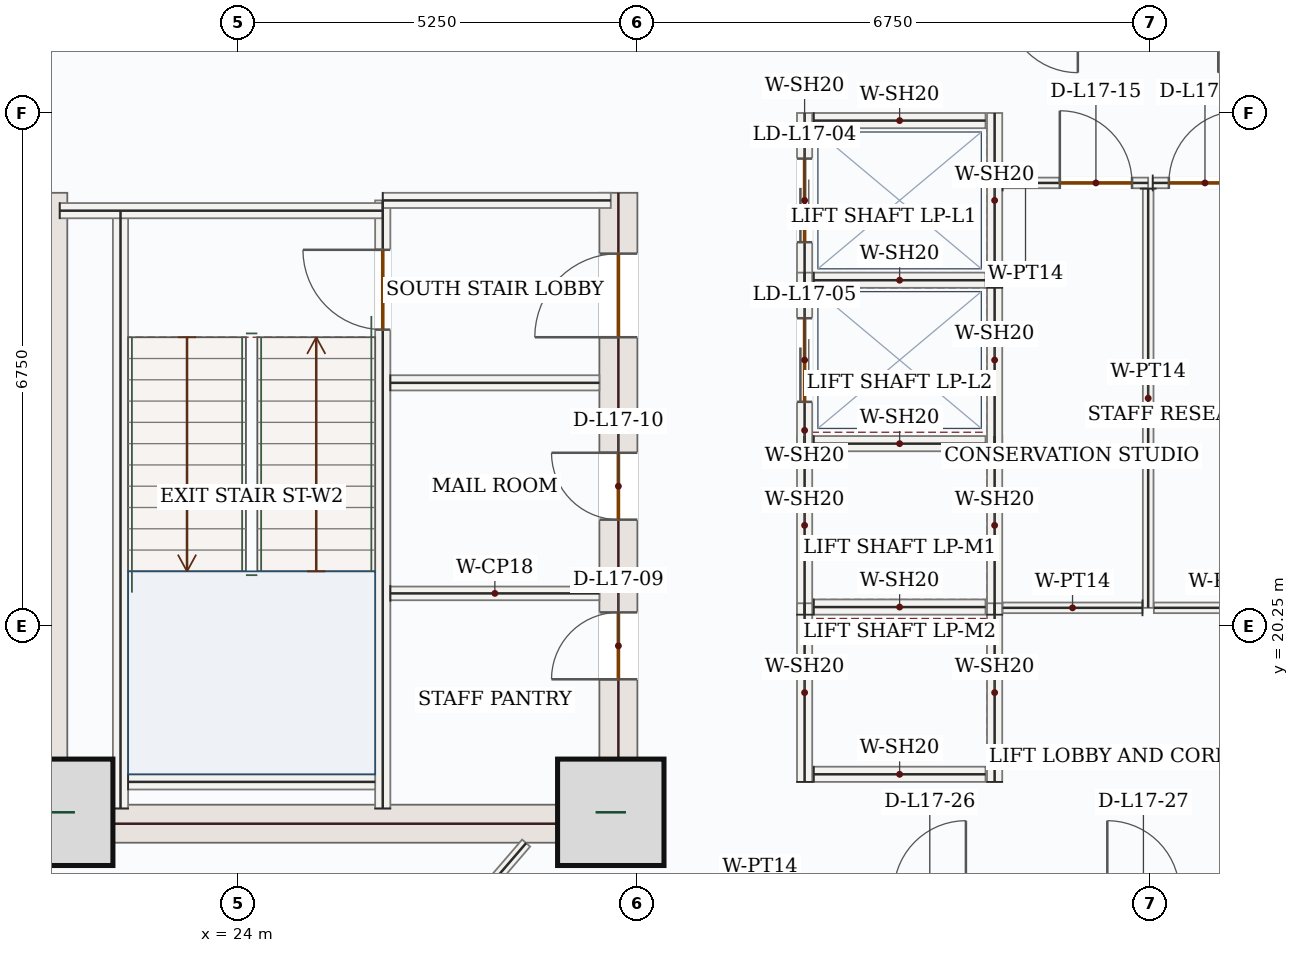
"""IFC4 building model, lengths in metres.
Left out: names, types, materials, properties, quantities, classifications, styles, units other than length and angle.
Written with IfcOpenShell. Run it as: python <this file> out.ifc"""

import sys

from ifc_helpers import new_model, si_unit, direction, frame, frame_2d, origin, origin_2d, place, context, subcontext, project, spatial, rectangle, extrude, source, transform, mapped, element, fill, save


model = new_model("IFC4")
c1 = context("Model", 3, precision=1e-05, world=origin(), true_north=direction((0.0, 1.0)))
c2 = subcontext(c1, "Body", "Model", "MODEL_VIEW")
j1 = project(units=[si_unit("LENGTHUNIT", "METRE"), si_unit("PLANEANGLEUNIT", "RADIAN")], contexts=[c1])
p1 = place(None, origin())
s1 = spatial("IfcSite", under=j1, at=p1, CompositionType="ELEMENT")
p2 = place(p1, origin())
s2 = spatial("IfcBuilding", under=s1, at=p2, CompositionType="ELEMENT")
p3 = place(p2, frame((0.0, 0.0, 79.5)))
s3 = spatial("IfcBuildingStorey", under=s2, at=p3, CompositionType="ELEMENT", Elevation=79.5)
m1 = source(origin(), c2, "Body", "SweptSolid", [
    extrude(rectangle(XDim=8.55, YDim=0.5, at=frame_2d((4.275, 0.0))), origin(), (0.0, 0.0, 1.0), 3.95),
])
p4 = place(p3, frame((21.5, 17.4, 0.0), z_axis=(0.0, 0.0, 1.0), x_axis=(0.0, 1.0, 0.0)))
e1 = element("IfcWall", 1, at=p4, inside=s3, PredefinedType="SHEAR", context=c2, shape_type="MappedRepresentation", body=[
    mapped(m1, transform((0.0, 0.0, 0.0), x_axis=(1.0, 0.0, 0.0), y_axis=(0.0, 1.0, 0.0), z_axis=(0.0, 0.0, 1.0), scale=1.0)),
])
p5 = place(p3, frame((29.0, 17.4, 0.0), z_axis=(0.0, 0.0, 1.0), x_axis=(0.0, 1.0, 0.0)))
e2 = element("IfcWall", 2, at=p5, inside=s3, PredefinedType="SHEAR", context=c2, shape_type="SweptSolid", body=[
    extrude(rectangle(XDim=8.55, YDim=0.5, at=frame_2d((4.275, 0.0))), origin(), (0.0, 0.0, 1.0), 3.95),
])
p6 = place(p5, frame((6.65, 0.0, 0.0)))
e3 = element("IfcOpeningElement", 3, at=p6, cuts=e2, PredefinedType="OPENING", context=c2, shape_type="SweptSolid", body=[
    extrude(rectangle(XDim=1.1, YDim=2.2, at=frame_2d((0.55, 1.1))), frame((0.0, 0.26, 0.0), z_axis=(0.0, -1.0, 0.0), x_axis=(1.0, 0.0, 0.0)), (0.0, 0.0, 1.0), 0.52),
])
p7 = place(p5, frame((2.15, 0.0, 0.0)))
e4 = element("IfcOpeningElement", 4, at=p7, cuts=e2, PredefinedType="OPENING", context=c2, shape_type="SweptSolid", body=[
    extrude(rectangle(XDim=0.88, YDim=2.1, at=frame_2d((0.44, 1.05))), frame((0.0, 0.26, 0.0), z_axis=(0.0, -1.0, 0.0), x_axis=(1.0, 0.0, 0.0)), (0.0, 0.0, 1.0), 0.52),
])
p8 = place(p5, frame((4.25, 0.0, 0.0)))
e5 = element("IfcOpeningElement", 5, at=p8, cuts=e2, PredefinedType="OPENING", context=c2, shape_type="SweptSolid", body=[
    extrude(rectangle(XDim=0.88, YDim=2.1, at=frame_2d((0.44, 1.05))), frame((0.0, 0.26, 0.0), z_axis=(0.0, -1.0, 0.0), x_axis=(1.0, 0.0, 0.0)), (0.0, 0.0, 1.0), 0.52),
])
m2 = source(origin(), c2, "Body", "SweptSolid", [
    extrude(rectangle(XDim=7.0, YDim=0.5, at=frame_2d((3.5, 0.0))), origin(), (0.0, 0.0, 1.0), 3.95),
])
p9 = place(p3, frame((21.75, 17.65, 0.0), z_axis=(0.0, 0.0, 1.0), x_axis=(1.0, 0.0, 0.0)))
e6 = element("IfcWall", 6, at=p9, inside=s3, PredefinedType="SHEAR", context=c2, shape_type="MappedRepresentation", body=[
    mapped(m2, transform((0.0, 0.0, 0.0), x_axis=(1.0, 0.0, 0.0), y_axis=(0.0, 1.0, 0.0), z_axis=(0.0, 0.0, 1.0), scale=1.0)),
])
m3 = source(origin(), c2, "Body", "SweptSolid", [
    extrude(rectangle(XDim=1.4, YDim=1.4, at=origin_2d()), origin(), (0.0, 0.0, 1.0), 4.2),
])
for number, where, z_axis, x_axis in (
    (7, (21.65, 17.8, 0.0), (0.0, 0.0, 1.0), (1.0, 0.0, 0.0)),
    (8, (28.9, 17.8, 0.0), (0.0, 0.0, 1.0), (1.0, 0.0, 0.0)),
):
    element("IfcColumn", number, at=place(p3, frame(where, z_axis=z_axis, x_axis=x_axis)), inside=s3, PredefinedType="COLUMN", context=c2, shape_type="MappedRepresentation", body=[
        mapped(m3, transform((0.0, 0.0, 0.0), x_axis=(1.0, 0.0, 0.0), y_axis=(0.0, 1.0, 0.0), z_axis=(0.0, 0.0, 1.0), scale=1.0)),
    ])
p10 = place(p3, frame((22.658, 14.74, 0.0), z_axis=(0.0, 0.0, 1.0), x_axis=(-0.707106781187, 0.707106781187, 0.0)))
e9 = element("IfcWall", 9, at=p10, inside=s3, PredefinedType="SOLIDWALL", context=c2, shape_type="SweptSolid", body=[
    extrude(rectangle(XDim=5.258, YDim=0.32, at=frame_2d((2.629, 0.0))), origin(), (0.0, 0.0, 1.0), 3.95),
])
p11 = place(p10, frame((1.429, 0.0, 0.85)))
e10 = element("IfcOpeningElement", 10, at=p11, cuts=e9, PredefinedType="OPENING", context=c2, shape_type="SweptSolid", body=[
    extrude(rectangle(XDim=2.4, YDim=1.8, at=frame_2d((1.2, 0.9))), frame((0.0, 0.17, 0.0), z_axis=(0.0, -1.0, 0.0), x_axis=(1.0, 0.0, 0.0)), (0.0, 0.0, 1.0), 0.34),
])
m4 = source(origin(), c2, "Body", "SweptSolid", [
    extrude(rectangle(XDim=7.87, YDim=0.2, at=frame_2d((3.935, 0.0))), origin(), (0.0, 0.0, 1.0), 3.95),
])
p12 = place(p3, frame((22.45, 17.85, 0.0), z_axis=(0.0, 0.0, 1.0), x_axis=(0.0, 1.0, 0.0)))
e11 = element("IfcWall", 11, at=p12, inside=s3, PredefinedType="SOLIDWALL", context=c2, shape_type="MappedRepresentation", body=[
    mapped(m4, transform((0.0, 0.0, 0.0), x_axis=(1.0, 0.0, 0.0), y_axis=(0.0, 1.0, 0.0), z_axis=(0.0, 0.0, 1.0), scale=1.0)),
])
p13 = place(p3, frame((25.9, 17.85, 0.0), z_axis=(0.0, 0.0, 1.0), x_axis=(0.0, 1.0, 0.0)))
e12 = element("IfcWall", 12, at=p13, inside=s3, PredefinedType="SOLIDWALL", context=c2, shape_type="SweptSolid", body=[
    extrude(rectangle(XDim=8.0, YDim=0.2, at=frame_2d((4.0, 0.0))), origin(), (0.0, 0.0, 1.0), 3.95),
])
p14 = place(p13, frame((6.3, 0.0, 0.0)))
e13 = element("IfcOpeningElement", 13, at=p14, cuts=e12, PredefinedType="OPENING", context=c2, shape_type="SweptSolid", body=[
    extrude(rectangle(XDim=1.05, YDim=2.15, at=frame_2d((0.525, 1.075))), frame((0.0, 0.11, 0.0), z_axis=(0.0, -1.0, 0.0), x_axis=(1.0, 0.0, 0.0)), (0.0, 0.0, 1.0), 0.22),
])
m5 = source(origin(), c2, "Body", "SweptSolid", [
    extrude(rectangle(XDim=4.25, YDim=0.2, at=frame_2d((2.125, 0.0))), origin(), (0.0, 0.0, 1.0), 3.95),
])
p15 = place(p3, frame((21.65, 25.715, 0.0), z_axis=(0.0, 0.0, 1.0), x_axis=(1.0, 0.0, 0.0)))
e14 = element("IfcWall", 14, at=p15, inside=s3, PredefinedType="SOLIDWALL", context=c2, shape_type="MappedRepresentation", body=[
    mapped(m5, transform((0.0, 0.0, 0.0), x_axis=(1.0, 0.0, 0.0), y_axis=(0.0, 1.0, 0.0), z_axis=(0.0, 0.0, 1.0), scale=1.0)),
])
m6 = source(origin(), c2, "Body", "SweptSolid", [
    extrude(rectangle(XDim=3.0, YDim=0.2, at=frame_2d((1.5, 0.0))), origin(), (0.0, 0.0, 1.0), 3.95),
])
p16 = place(p3, frame((25.9, 25.85, 0.0), z_axis=(0.0, 0.0, 1.0), x_axis=(1.0, 0.0, 0.0)))
e15 = element("IfcWall", 15, at=p16, inside=s3, PredefinedType="SOLIDWALL", context=c2, shape_type="MappedRepresentation", body=[
    mapped(m6, transform((0.0, 0.0, 0.0), x_axis=(1.0, 0.0, 0.0), y_axis=(0.0, 1.0, 0.0), z_axis=(0.0, 0.0, 1.0), scale=1.0)),
])
m7 = source(origin(), c2, "Body", "SweptSolid", [
    extrude(rectangle(XDim=3.25, YDim=0.2, at=frame_2d((1.625, 0.0))), origin(), (0.0, 0.0, 1.0), 3.95),
])
p17 = place(p3, frame((22.55, 18.2, 0.0), z_axis=(0.0, 0.0, 1.0), x_axis=(1.0, 0.0, 0.0)))
e16 = element("IfcWall", 16, at=p17, inside=s3, PredefinedType="SOLIDWALL", context=c2, shape_type="MappedRepresentation", body=[
    mapped(m7, transform((0.0, 0.0, 0.0), x_axis=(1.0, 0.0, 0.0), y_axis=(0.0, 1.0, 0.0), z_axis=(0.0, 0.0, 1.0), scale=1.0)),
])
m8 = source(origin(), c2, "Body", "SweptSolid", [
    extrude(rectangle(XDim=2.75, YDim=0.2, at=frame_2d((1.375, 0.0))), origin(), (0.0, 0.0, 1.0), 3.95),
])
p18 = place(p3, frame((26.0, 23.45, 0.0), z_axis=(0.0, 0.0, 1.0), x_axis=(1.0, 0.0, 0.0)))
e17 = element("IfcWall", 17, at=p18, inside=s3, PredefinedType="SOLIDWALL", context=c2, shape_type="MappedRepresentation", body=[
    mapped(m8, transform((0.0, 0.0, 0.0), x_axis=(1.0, 0.0, 0.0), y_axis=(0.0, 1.0, 0.0), z_axis=(0.0, 0.0, 1.0), scale=1.0)),
])
m9 = source(origin(), c2, "Body", "SweptSolid", [
    extrude(rectangle(XDim=2.75, YDim=0.18, at=frame_2d((1.375, 0.0))), origin(), (0.0, 0.0, 1.0), 3.95),
])
p19 = place(p3, frame((26.0, 20.68, 0.0), z_axis=(0.0, 0.0, 1.0), x_axis=(1.0, 0.0, 0.0)))
e18 = element("IfcWall", 18, at=p19, inside=s3, PredefinedType="PARTITIONING", context=c2, shape_type="MappedRepresentation", body=[
    mapped(m9, transform((0.0, 0.0, 0.0), x_axis=(1.0, 0.0, 0.0), y_axis=(0.0, 1.0, 0.0), z_axis=(0.0, 0.0, 1.0), scale=1.0)),
])
m10 = source(origin(), c2, "Body", "SweptSolid", [
    extrude(rectangle(XDim=2.35, YDim=0.2, at=frame_2d((1.175, 0.0))), origin(), (0.0, 0.0, 1.0), 3.95),
])
for number, where, z_axis, x_axis in (
    (19, (31.45, 20.4, 0.0), (0.0, 0.0, 1.0), (0.0, 1.0, 0.0)),
    (20, (33.95, 20.4, 0.0), (0.0, 0.0, 1.0), (0.0, 1.0, 0.0)),
):
    element("IfcWall", number, at=place(p3, frame(where, z_axis=z_axis, x_axis=x_axis)), inside=s3, PredefinedType="SOLIDWALL", context=c2, shape_type="MappedRepresentation", body=[
        mapped(m10, transform((0.0, 0.0, 0.0), x_axis=(1.0, 0.0, 0.0), y_axis=(0.0, 1.0, 0.0), z_axis=(0.0, 0.0, 1.0), scale=1.0)),
    ])
m11 = source(origin(), c2, "Body", "SweptSolid", [
    extrude(rectangle(XDim=2.26, YDim=0.2, at=frame_2d((1.13, 0.0))), origin(), (0.0, 0.0, 1.0), 3.95),
])
for number, where, z_axis, x_axis in (
    (21, (31.57, 20.5, 0.0), (0.0, 0.0, 1.0), (1.0, 0.0, 0.0)),
    (22, (31.57, 22.65, 0.0), (0.0, 0.0, 1.0), (1.0, 0.0, 0.0)),
):
    element("IfcWall", number, at=place(p3, frame(where, z_axis=z_axis, x_axis=x_axis)), inside=s3, PredefinedType="SOLIDWALL", context=c2, shape_type="MappedRepresentation", body=[
        mapped(m11, transform((0.0, 0.0, 0.0), x_axis=(1.0, 0.0, 0.0), y_axis=(0.0, 1.0, 0.0), z_axis=(0.0, 0.0, 1.0), scale=1.0)),
    ])
for number, where, z_axis, x_axis in (
    (23, (31.45, 18.2, 0.0), (0.0, 0.0, 1.0), (0.0, 1.0, 0.0)),
    (24, (33.95, 18.2, 0.0), (0.0, 0.0, 1.0), (0.0, 1.0, 0.0)),
):
    element("IfcWall", number, at=place(p3, frame(where, z_axis=z_axis, x_axis=x_axis)), inside=s3, PredefinedType="SOLIDWALL", context=c2, shape_type="MappedRepresentation", body=[
        mapped(m10, transform((0.0, 0.0, 0.0), x_axis=(1.0, 0.0, 0.0), y_axis=(0.0, 1.0, 0.0), z_axis=(0.0, 0.0, 1.0), scale=1.0)),
    ])
p20 = place(p3, frame((31.57, 18.3, 0.0), z_axis=(0.0, 0.0, 1.0), x_axis=(1.0, 0.0, 0.0)))
e25 = element("IfcWall", 25, at=p20, inside=s3, PredefinedType="SOLIDWALL", context=c2, shape_type="MappedRepresentation", body=[
    mapped(m11, transform((0.0, 0.0, 0.0), x_axis=(1.0, 0.0, 0.0), y_axis=(0.0, 1.0, 0.0), z_axis=(0.0, 0.0, 1.0), scale=1.0)),
])
p21 = place(p3, frame((31.45, 24.7, 0.0), z_axis=(0.0, 0.0, 1.0), x_axis=(0.0, 1.0, 0.0)))
e26 = element("IfcWall", 26, at=p21, inside=s3, PredefinedType="SOLIDWALL", context=c2, shape_type="SweptSolid", body=[
    extrude(rectangle(XDim=2.3, YDim=0.2, at=frame_2d((1.15, 0.0))), origin(), (0.0, 0.0, 1.0), 3.95),
])
p22 = place(p21, frame((0.6, 0.0, 0.0)))
e27 = element("IfcOpeningElement", 27, at=p22, cuts=e26, PredefinedType="OPENING", context=c2, shape_type="SweptSolid", body=[
    extrude(rectangle(XDim=1.1, YDim=2.15, at=frame_2d((0.55, 1.075))), frame((0.0, 0.11, 0.0), z_axis=(0.0, -1.0, 0.0), x_axis=(1.0, 0.0, 0.0)), (0.0, 0.0, 1.0), 0.22),
])
m12 = source(origin(), c2, "Body", "SweptSolid", [
    extrude(rectangle(XDim=2.3, YDim=0.2, at=frame_2d((1.15, 0.0))), origin(), (0.0, 0.0, 1.0), 3.95),
])
p23 = place(p3, frame((33.95, 24.7, 0.0), z_axis=(0.0, 0.0, 1.0), x_axis=(0.0, 1.0, 0.0)))
e28 = element("IfcWall", 28, at=p23, inside=s3, PredefinedType="SOLIDWALL", context=c2, shape_type="MappedRepresentation", body=[
    mapped(m12, transform((0.0, 0.0, 0.0), x_axis=(1.0, 0.0, 0.0), y_axis=(0.0, 1.0, 0.0), z_axis=(0.0, 0.0, 1.0), scale=1.0)),
])
for number, where, z_axis, x_axis in (
    (29, (31.57, 24.8, 0.0), (0.0, 0.0, 1.0), (1.0, 0.0, 0.0)),
    (30, (31.57, 26.9, 0.0), (0.0, 0.0, 1.0), (1.0, 0.0, 0.0)),
):
    element("IfcWall", number, at=place(p3, frame(where, z_axis=z_axis, x_axis=x_axis)), inside=s3, PredefinedType="SOLIDWALL", context=c2, shape_type="MappedRepresentation", body=[
        mapped(m11, transform((0.0, 0.0, 0.0), x_axis=(1.0, 0.0, 0.0), y_axis=(0.0, 1.0, 0.0), z_axis=(0.0, 0.0, 1.0), scale=1.0)),
    ])
p24 = place(p3, frame((31.45, 22.6, 0.0), z_axis=(0.0, 0.0, 1.0), x_axis=(0.0, 1.0, 0.0)))
e31 = element("IfcWall", 31, at=p24, inside=s3, PredefinedType="SOLIDWALL", context=c2, shape_type="SweptSolid", body=[
    extrude(rectangle(XDim=2.3, YDim=0.2, at=frame_2d((1.15, 0.0))), origin(), (0.0, 0.0, 1.0), 3.95),
])
p25 = place(p24, frame((0.6, 0.0, 0.0)))
e32 = element("IfcOpeningElement", 32, at=p25, cuts=e31, PredefinedType="OPENING", context=c2, shape_type="SweptSolid", body=[
    extrude(rectangle(XDim=1.1, YDim=2.15, at=frame_2d((0.55, 1.075))), frame((0.0, 0.11, 0.0), z_axis=(0.0, -1.0, 0.0), x_axis=(1.0, 0.0, 0.0)), (0.0, 0.0, 1.0), 0.22),
])
m13 = source(origin(), c2, "Body", "SweptSolid", [
    extrude(rectangle(XDim=2.3, YDim=0.2, at=frame_2d((1.15, 0.0))), origin(), (0.0, 0.0, 1.0), 3.95),
])
p26 = place(p3, frame((33.95, 22.6, 0.0), z_axis=(0.0, 0.0, 1.0), x_axis=(0.0, 1.0, 0.0)))
e33 = element("IfcWall", 33, at=p26, inside=s3, PredefinedType="SOLIDWALL", context=c2, shape_type="MappedRepresentation", body=[
    mapped(m13, transform((0.0, 0.0, 0.0), x_axis=(1.0, 0.0, 0.0), y_axis=(0.0, 1.0, 0.0), z_axis=(0.0, 0.0, 1.0), scale=1.0)),
])
p27 = place(p3, frame((34.055, 26.08, 0.0), z_axis=(0.0, 0.0, 1.0), x_axis=(1.0, 0.0, 0.0)))
e34 = element("IfcWall", 34, at=p27, inside=s3, PredefinedType="PARTITIONING", context=c2, shape_type="SweptSolid", body=[
    extrude(rectangle(XDim=1.915, YDim=0.14, at=frame_2d((0.958, 0.0))), origin(), (0.0, 0.0, 1.0), 3.95),
])
p28 = place(p27, frame((0.753, 0.0, 0.0)))
e35 = element("IfcOpeningElement", 35, at=p28, cuts=e34, PredefinedType="OPENING", context=c2, shape_type="SweptSolid", body=[
    extrude(rectangle(XDim=0.95, YDim=2.15, at=frame_2d((0.475, 1.075))), frame((0.0, 0.08, 0.0), z_axis=(0.0, -1.0, 0.0), x_axis=(1.0, 0.0, 0.0)), (0.0, 0.0, 1.0), 0.16),
])
m14 = source(origin(), c2, "Body", "SweptSolid", [
    extrude(rectangle(XDim=5.515, YDim=0.14, at=frame_2d((2.757, 0.0))), origin(), (0.0, 0.0, 1.0), 3.95),
])
p29 = place(p3, frame((35.97, 26.005, 0.0), z_axis=(0.0, 0.0, 1.0), x_axis=(0.0, -1.0, 0.0)))
e36 = element("IfcWall", 36, at=p29, inside=s3, PredefinedType="PARTITIONING", context=c2, shape_type="MappedRepresentation", body=[
    mapped(m14, transform((0.0, 0.0, 0.0), x_axis=(1.0, 0.0, 0.0), y_axis=(0.0, 1.0, 0.0), z_axis=(0.0, 0.0, 1.0), scale=1.0)),
])
m15 = source(origin(), c2, "Body", "SweptSolid", [
    extrude(rectangle(XDim=1.84, YDim=0.14, at=frame_2d((0.92, 0.0))), origin(), (0.0, 0.0, 1.0), 3.95),
])
p30 = place(p3, frame((35.895, 20.49, 0.0), z_axis=(0.0, 0.0, 1.0), x_axis=(-1.0, 0.0, 0.0)))
e37 = element("IfcWall", 37, at=p30, inside=s3, PredefinedType="PARTITIONING", context=c2, shape_type="MappedRepresentation", body=[
    mapped(m15, transform((0.0, 0.0, 0.0), x_axis=(1.0, 0.0, 0.0), y_axis=(0.0, 1.0, 0.0), z_axis=(0.0, 0.0, 1.0), scale=1.0)),
])
p31 = place(p3, frame((36.03, 26.08, 0.0), z_axis=(0.0, 0.0, 1.0), x_axis=(1.0, 0.0, 0.0)))
e38 = element("IfcWall", 38, at=p31, inside=s3, PredefinedType="PARTITIONING", context=c2, shape_type="SweptSolid", body=[
    extrude(rectangle(XDim=1.915, YDim=0.14, at=frame_2d((0.958, 0.0))), origin(), (0.0, 0.0, 1.0), 3.95),
])
p32 = place(p31, frame((0.212, 0.0, 0.0)))
e39 = element("IfcOpeningElement", 39, at=p32, cuts=e38, PredefinedType="OPENING", context=c2, shape_type="SweptSolid", body=[
    extrude(rectangle(XDim=0.95, YDim=2.15, at=frame_2d((0.475, 1.075))), frame((0.0, 0.08, 0.0), z_axis=(0.0, -1.0, 0.0), x_axis=(1.0, 0.0, 0.0)), (0.0, 0.0, 1.0), 0.16),
])
m16 = source(origin(), c2, "Body", "SweptSolid", [
    extrude(rectangle(XDim=1.9, YDim=0.14, at=frame_2d((0.95, 0.0))), origin(), (0.0, 0.0, 1.0), 3.95),
])
p33 = place(p3, frame((37.945, 20.49, 0.0), z_axis=(0.0, 0.0, 1.0), x_axis=(-1.0, 0.0, 0.0)))
e40 = element("IfcWall", 40, at=p33, inside=s3, PredefinedType="PARTITIONING", context=c2, shape_type="MappedRepresentation", body=[
    mapped(m16, transform((0.0, 0.0, 0.0), x_axis=(1.0, 0.0, 0.0), y_axis=(0.0, 1.0, 0.0), z_axis=(0.0, 0.0, 1.0), scale=1.0)),
])
m17 = source(origin(), c2, "Body", "SweptSolid", [
    extrude(rectangle(XDim=3.29, YDim=0.14, at=frame_2d((1.645, 0.0))), origin(), (0.0, 0.0, 1.0), 3.95),
])
p34 = place(p3, frame((25.64, 14.901, 0.0), z_axis=(0.0, 0.0, 1.0), x_axis=(0.652214149627, 0.758034763732, 0.0)))
e41 = element("IfcWall", 41, at=p34, inside=s3, PredefinedType="PARTITIONING", context=c2, shape_type="MappedRepresentation", body=[
    mapped(m17, transform((0.0, 0.0, 0.0), x_axis=(1.0, 0.0, 0.0), y_axis=(0.0, 1.0, 0.0), z_axis=(0.0, 0.0, 1.0), scale=1.0)),
])
m18 = source(origin(), c2, "Body", "SweptSolid", [
    extrude(rectangle(XDim=2.4, YDim=1.8, at=frame_2d((1.2, 0.9))), frame((0.0, 0.03, 0.0), z_axis=(0.0, -1.0, 0.0), x_axis=(1.0, 0.0, 0.0)), (0.0, 0.0, 1.0), 0.06),
])
p35 = place(p11, origin())
e42 = element("IfcWindow", 42, at=p35, inside=s3, PartitioningType="DOUBLE_PANEL_VERTICAL", PredefinedType="WINDOW", context=c2, shape_type="MappedRepresentation", body=[
    mapped(m18, transform((0.0, 0.0, 0.0), x_axis=(1.0, 0.0, 0.0), y_axis=(0.0, 1.0, 0.0), z_axis=(0.0, 0.0, 1.0), scale=1.0)),
])
fill(e10, e42)
m19 = source(origin(), c2, "Body", "SweptSolid", [
    extrude(rectangle(XDim=1.05, YDim=2.15, at=frame_2d((0.525, 1.075))), frame((0.0, 0.025, 0.0), z_axis=(0.0, -1.0, 0.0), x_axis=(1.0, 0.0, 0.0)), (0.0, 0.0, 1.0), 0.05),
])
p36 = place(p14, origin())
e43 = element("IfcDoor", 43, at=p36, inside=s3, OperationType="SINGLE_SWING_RIGHT", PredefinedType="DOOR", context=c2, shape_type="MappedRepresentation", body=[
    mapped(m19, transform((0.0, 0.0, 0.0), x_axis=(1.0, 0.0, 0.0), y_axis=(0.0, 1.0, 0.0), z_axis=(0.0, 0.0, 1.0), scale=1.0)),
])
fill(e13, e43)
m20 = source(origin(), c2, "Body", "SweptSolid", [
    extrude(rectangle(XDim=1.1, YDim=2.2, at=frame_2d((0.55, 1.1))), frame((0.0, 0.025, 0.0), z_axis=(0.0, -1.0, 0.0), x_axis=(1.0, 0.0, 0.0)), (0.0, 0.0, 1.0), 0.05),
])
p37 = place(p6, origin())
e44 = element("IfcDoor", 44, at=p37, inside=s3, OperationType="SINGLE_SWING_LEFT", PredefinedType="DOOR", context=c2, shape_type="MappedRepresentation", body=[
    mapped(m20, transform((0.0, 0.0, 0.0), x_axis=(1.0, 0.0, 0.0), y_axis=(0.0, 1.0, 0.0), z_axis=(0.0, 0.0, 1.0), scale=1.0)),
])
fill(e3, e44)
m21 = source(origin(), c2, "Body", "SweptSolid", [
    extrude(rectangle(XDim=0.88, YDim=2.1, at=frame_2d((0.44, 1.05))), frame((0.0, 0.025, 0.0), z_axis=(0.0, -1.0, 0.0), x_axis=(1.0, 0.0, 0.0)), (0.0, 0.0, 1.0), 0.05),
])
p38 = place(p7, origin())
e45 = element("IfcDoor", 45, at=p38, inside=s3, OperationType="SINGLE_SWING_LEFT", PredefinedType="DOOR", context=c2, shape_type="MappedRepresentation", body=[
    mapped(m21, transform((0.0, 0.0, 0.0), x_axis=(1.0, 0.0, 0.0), y_axis=(0.0, 1.0, 0.0), z_axis=(0.0, 0.0, 1.0), scale=1.0)),
])
fill(e4, e45)
p39 = place(p8, origin())
e46 = element("IfcDoor", 46, at=p39, inside=s3, OperationType="SINGLE_SWING_RIGHT", PredefinedType="DOOR", context=c2, shape_type="MappedRepresentation", body=[
    mapped(m21, transform((0.0, 0.0, 0.0), x_axis=(1.0, 0.0, 0.0), y_axis=(0.0, 1.0, 0.0), z_axis=(0.0, 0.0, 1.0), scale=1.0)),
])
fill(e5, e46)
m22 = source(origin(), c2, "Body", "SweptSolid", [
    extrude(rectangle(XDim=1.1, YDim=2.15, at=frame_2d((0.55, 1.075))), frame((0.0, 0.025, 0.0), z_axis=(0.0, -1.0, 0.0), x_axis=(1.0, 0.0, 0.0)), (0.0, 0.0, 1.0), 0.05),
])
p40 = place(p22, origin())
e47 = element("IfcDoor", 47, at=p40, inside=s3, OperationType="DOUBLE_DOOR_SLIDING", PredefinedType="DOOR", context=c2, shape_type="MappedRepresentation", body=[
    mapped(m22, transform((0.0, 0.0, 0.0), x_axis=(1.0, 0.0, 0.0), y_axis=(0.0, 1.0, 0.0), z_axis=(0.0, 0.0, 1.0), scale=1.0)),
])
fill(e27, e47)
p41 = place(p25, origin())
e48 = element("IfcDoor", 48, at=p41, inside=s3, OperationType="DOUBLE_DOOR_SLIDING", PredefinedType="DOOR", context=c2, shape_type="MappedRepresentation", body=[
    mapped(m22, transform((0.0, 0.0, 0.0), x_axis=(1.0, 0.0, 0.0), y_axis=(0.0, 1.0, 0.0), z_axis=(0.0, 0.0, 1.0), scale=1.0)),
])
fill(e32, e48)
m23 = source(origin(), c2, "Body", "SweptSolid", [
    extrude(rectangle(XDim=0.95, YDim=2.15, at=frame_2d((0.475, 1.075))), frame((0.0, 0.025, 0.0), z_axis=(0.0, -1.0, 0.0), x_axis=(1.0, 0.0, 0.0)), (0.0, 0.0, 1.0), 0.05),
])
p42 = place(p28, origin())
e49 = element("IfcDoor", 49, at=p42, inside=s3, OperationType="SINGLE_SWING_LEFT", PredefinedType="DOOR", context=c2, shape_type="MappedRepresentation", body=[
    mapped(m23, transform((0.0, 0.0, 0.0), x_axis=(1.0, 0.0, 0.0), y_axis=(0.0, 1.0, 0.0), z_axis=(0.0, 0.0, 1.0), scale=1.0)),
])
fill(e35, e49)
p43 = place(p32, origin())
e50 = element("IfcDoor", 50, at=p43, inside=s3, OperationType="SINGLE_SWING_RIGHT", PredefinedType="DOOR", context=c2, shape_type="MappedRepresentation", body=[
    mapped(m23, transform((0.0, 0.0, 0.0), x_axis=(1.0, 0.0, 0.0), y_axis=(0.0, 1.0, 0.0), z_axis=(0.0, 0.0, 1.0), scale=1.0)),
])
fill(e39, e50)
save(model, sys.argv[1])
